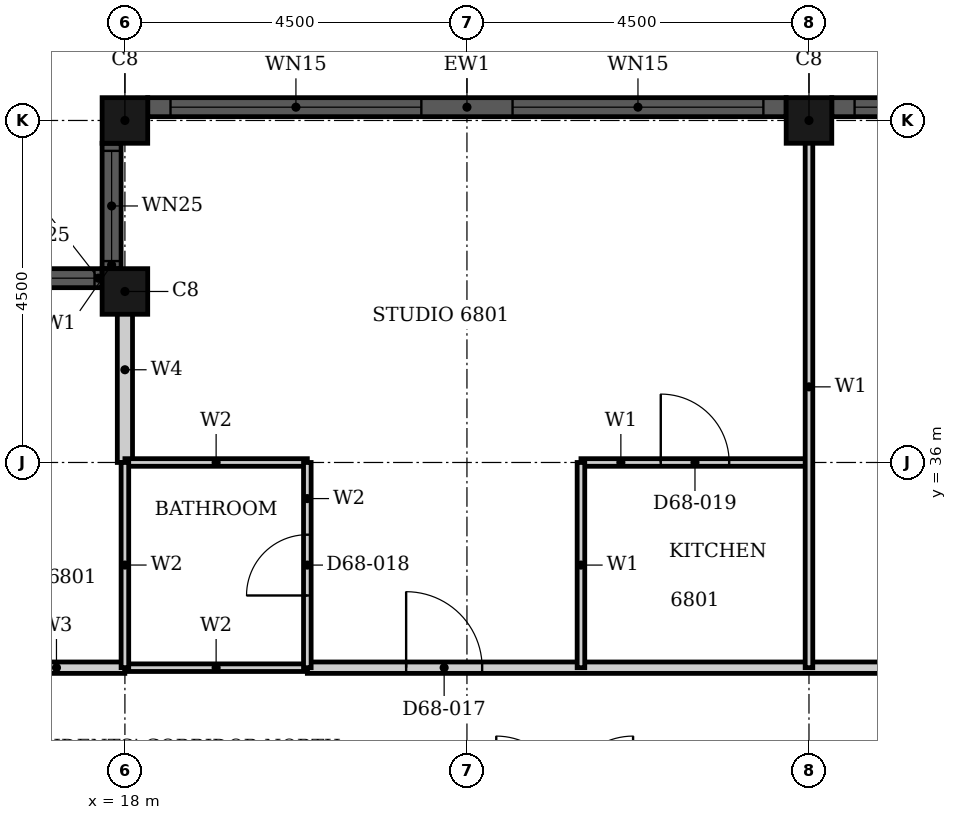
"""IFC4 building model, lengths in metres.
Left out: names, types, materials, properties, quantities, classifications, styles, units other than length and angle.
Written with IfcOpenShell. Run it as: python <this file> out.ifc"""

import sys

from ifc_helpers import new_model, si_unit, direction, frame, frame_2d, origin, origin_2d, place, context, subcontext, project, spatial, rectangle, hollow_rectangle, extrude, element, fill, save


model = new_model("IFC4")
c1 = context("Model", 3, precision=1e-05, world=origin(), true_north=direction((0.0, 1.0)))
c2 = subcontext(c1, "Body", "Model", "MODEL_VIEW")
j1 = project(units=[si_unit("LENGTHUNIT", "METRE"), si_unit("PLANEANGLEUNIT", "RADIAN")], contexts=[c1])
p1 = place(None, origin())
s1 = spatial("IfcSite", under=j1, at=p1, CompositionType="ELEMENT")
p2 = place(p1, origin())
s2 = spatial("IfcBuilding", under=s1, at=p2, CompositionType="ELEMENT")
p3 = place(p2, frame((0.0, 0.0, 267.5)))
s3 = spatial("IfcBuildingStorey", under=s2, at=p3, CompositionType="ELEMENT", Elevation=267.5)
for number, where, z_axis, x_axis in (
    (1, (27.0, 40.5, 0.0), (0.0, 0.0, 1.0), (1.0, 0.0, 0.0)),
    (2, (18.0, 40.5, 0.0), (0.0, 0.0, 1.0), (1.0, 0.0, 0.0)),
    (3, (18.0, 38.25, 0.0), (0.0, 0.0, 1.0), (1.0, 0.0, 0.0)),
):
    element("IfcColumn", number, at=place(p3, frame(where, z_axis=z_axis, x_axis=x_axis)), inside=s3, PredefinedType="COLUMN", context=c2, shape_type="SweptSolid", body=[
        extrude(hollow_rectangle(XDim=0.6, YDim=0.6, WallThickness=0.02, at=origin_2d()), origin(), (0.0, 0.0, 1.0), 3.7),
    ])
p4 = place(p3, frame((35.7, 40.675, 0.0), z_axis=(0.0, 0.0, 1.0), x_axis=(-1.0, 0.0, 0.0)))
e4 = element("IfcWall", 4, at=p4, inside=s3, PredefinedType="SOLIDWALL", context=c2, shape_type="SweptSolid", body=[
    extrude(rectangle(XDim=8.4, YDim=0.25, at=frame_2d((4.2, 0.0))), origin(), (0.0, 0.0, 1.0), 3.7),
])
p5 = place(p4, frame((0.3, 0.0, 0.45)))
e5 = element("IfcOpeningElement", 5, at=p5, cuts=e4, PredefinedType="OPENING", context=c2, shape_type="SweptSolid", body=[
    extrude(rectangle(XDim=3.3, YDim=2.3, at=frame_2d((1.65, 1.15))), frame((0.0, 0.135, 0.0), z_axis=(0.0, -1.0, 0.0), x_axis=(1.0, 0.0, 0.0)), (0.0, 0.0, 1.0), 0.27),
])
p6 = place(p4, frame((4.8, 0.0, 0.45)))
e6 = element("IfcOpeningElement", 6, at=p6, cuts=e4, PredefinedType="OPENING", context=c2, shape_type="SweptSolid", body=[
    extrude(rectangle(XDim=3.3, YDim=2.3, at=frame_2d((1.65, 1.15))), frame((0.0, 0.135, 0.0), z_axis=(0.0, -1.0, 0.0), x_axis=(1.0, 0.0, 0.0)), (0.0, 0.0, 1.0), 0.27),
])
p7 = place(p3, frame((26.7, 40.675, 0.0), z_axis=(0.0, 0.0, 1.0), x_axis=(-1.0, 0.0, 0.0)))
e7 = element("IfcWall", 7, at=p7, inside=s3, PredefinedType="SOLIDWALL", context=c2, shape_type="SweptSolid", body=[
    extrude(rectangle(XDim=8.4, YDim=0.25, at=frame_2d((4.2, 0.0))), origin(), (0.0, 0.0, 1.0), 3.7),
])
p8 = place(p7, frame((0.3, 0.0, 0.45)))
e8 = element("IfcOpeningElement", 8, at=p8, cuts=e7, PredefinedType="OPENING", context=c2, shape_type="SweptSolid", body=[
    extrude(rectangle(XDim=3.3, YDim=2.3, at=frame_2d((1.65, 1.15))), frame((0.0, 0.135, 0.0), z_axis=(0.0, -1.0, 0.0), x_axis=(1.0, 0.0, 0.0)), (0.0, 0.0, 1.0), 0.27),
])
p9 = place(p7, frame((4.8, 0.0, 0.45)))
e9 = element("IfcOpeningElement", 9, at=p9, cuts=e7, PredefinedType="OPENING", context=c2, shape_type="SweptSolid", body=[
    extrude(rectangle(XDim=3.3, YDim=2.3, at=frame_2d((1.65, 1.15))), frame((0.0, 0.135, 0.0), z_axis=(0.0, -1.0, 0.0), x_axis=(1.0, 0.0, 0.0)), (0.0, 0.0, 1.0), 0.27),
])
p10 = place(p3, frame((17.825, 40.2, 0.0), z_axis=(0.0, 0.0, 1.0), x_axis=(0.0, -1.0, 0.0)))
e10 = element("IfcWall", 10, at=p10, inside=s3, PredefinedType="SOLIDWALL", context=c2, shape_type="SweptSolid", body=[
    extrude(rectangle(XDim=1.65, YDim=0.25, at=frame_2d((0.825, 0.0))), origin(), (0.0, 0.0, 1.0), 3.7),
])
p11 = place(p10, frame((0.1, 0.0, 0.9)))
e11 = element("IfcOpeningElement", 11, at=p11, cuts=e10, PredefinedType="OPENING", context=c2, shape_type="SweptSolid", body=[
    extrude(rectangle(XDim=1.45, YDim=1.85, at=frame_2d((0.725, 0.925))), frame((0.0, 0.135, 0.0), z_axis=(0.0, -1.0, 0.0), x_axis=(1.0, 0.0, 0.0)), (0.0, 0.0, 1.0), 0.27),
])
p12 = place(p3, frame((17.7, 38.425, 0.0), z_axis=(0.0, 0.0, 1.0), x_axis=(-1.0, 0.0, 0.0)))
e12 = element("IfcWall", 12, at=p12, inside=s3, PredefinedType="SOLIDWALL", context=c2, shape_type="SweptSolid", body=[
    extrude(rectangle(XDim=1.65, YDim=0.25, at=frame_2d((0.825, 0.0))), origin(), (0.0, 0.0, 1.0), 3.7),
])
p13 = place(p12, frame((0.1, 0.0, 0.9)))
e13 = element("IfcOpeningElement", 13, at=p13, cuts=e12, PredefinedType="OPENING", context=c2, shape_type="SweptSolid", body=[
    extrude(rectangle(XDim=1.45, YDim=1.85, at=frame_2d((0.725, 0.925))), frame((0.0, 0.135, 0.0), z_axis=(0.0, -1.0, 0.0), x_axis=(1.0, 0.0, 0.0)), (0.0, 0.0, 1.0), 0.27),
])
p14 = place(p3, frame((20.4, 33.3, 0.0), z_axis=(0.0, 0.0, 1.0), x_axis=(1.0, 0.0, 0.0)))
e14 = element("IfcWall", 14, at=p14, inside=s3, PredefinedType="PARTITIONING", context=c2, shape_type="SweptSolid", body=[
    extrude(rectangle(XDim=22.2, YDim=0.15, at=frame_2d((11.1, 0.0))), origin(), (0.0, 0.0, 1.0), 3.4),
])
p15 = place(p14, frame((1.3, 0.0, 0.0)))
e15 = element("IfcOpeningElement", 15, at=p15, cuts=e14, PredefinedType="OPENING", context=c2, shape_type="SweptSolid", body=[
    extrude(rectangle(XDim=1.0, YDim=2.2, at=frame_2d((0.5, 1.1))), frame((0.0, 0.085, 0.0), z_axis=(0.0, -1.0, 0.0), x_axis=(1.0, 0.0, 0.0)), (0.0, 0.0, 1.0), 0.17),
])
p16 = place(p14, frame((10.6, 0.0, 0.0)))
e16 = element("IfcOpeningElement", 16, at=p16, cuts=e14, PredefinedType="OPENING", context=c2, shape_type="SweptSolid", body=[
    extrude(rectangle(XDim=1.0, YDim=2.1, at=frame_2d((0.5, 1.05))), frame((0.0, 0.085, 0.0), z_axis=(0.0, -1.0, 0.0), x_axis=(1.0, 0.0, 0.0)), (0.0, 0.0, 1.0), 0.17),
])
p17 = place(p14, frame((19.9, 0.0, 0.0)))
e17 = element("IfcOpeningElement", 17, at=p17, cuts=e14, PredefinedType="OPENING", context=c2, shape_type="SweptSolid", body=[
    extrude(rectangle(XDim=1.0, YDim=2.2, at=frame_2d((0.5, 1.1))), frame((0.0, 0.085, 0.0), z_axis=(0.0, -1.0, 0.0), x_axis=(1.0, 0.0, 0.0)), (0.0, 0.0, 1.0), 0.17),
])
p18 = place(p3, frame((16.2, 33.3, 0.0), z_axis=(0.0, 0.0, 1.0), x_axis=(1.0, 0.0, 0.0)))
e18 = element("IfcWall", 18, at=p18, inside=s3, PredefinedType="PARTITIONING", context=c2, shape_type="SweptSolid", body=[
    extrude(rectangle(XDim=1.799, YDim=0.15, at=frame_2d((0.899, 0.0))), origin(), (0.0, 0.0, 1.0), 3.4),
])
p19 = place(p3, frame((24.0, 36.0, 0.0), z_axis=(0.0, 0.0, 1.0), x_axis=(1.0, 0.0, 0.0)))
e19 = element("IfcWall", 19, at=p19, inside=s3, PredefinedType="PARTITIONING", context=c2, shape_type="SweptSolid", body=[
    extrude(rectangle(XDim=3.0, YDim=0.1, at=frame_2d((1.5, 0.0))), origin(), (0.0, 0.0, 1.0), 3.4),
])
p20 = place(p19, frame((1.05, 0.0, 0.0)))
e20 = element("IfcOpeningElement", 20, at=p20, cuts=e19, PredefinedType="OPENING", context=c2, shape_type="SweptSolid", body=[
    extrude(rectangle(XDim=0.9, YDim=2.1, at=frame_2d((0.45, 1.05))), frame((0.0, 0.06, 0.0), z_axis=(0.0, -1.0, 0.0), x_axis=(1.0, 0.0, 0.0)), (0.0, 0.0, 1.0), 0.12),
])
p21 = place(p3, frame((24.0, 33.3, 0.0), z_axis=(0.0, 0.0, 1.0), x_axis=(0.0, 1.0, 0.0)))
e21 = element("IfcWall", 21, at=p21, inside=s3, PredefinedType="PARTITIONING", context=c2, shape_type="SweptSolid", body=[
    extrude(rectangle(XDim=2.7, YDim=0.1, at=frame_2d((1.35, 0.0))), origin(), (0.0, 0.0, 1.0), 3.4),
])
p22 = place(p3, frame((27.0, 33.3, 0.0), z_axis=(0.0, 0.0, 1.0), x_axis=(0.0, 1.0, 0.0)))
e22 = element("IfcWall", 22, at=p22, inside=s3, PredefinedType="PARTITIONING", context=c2, shape_type="SweptSolid", body=[
    extrude(rectangle(XDim=7.39, YDim=0.1, at=frame_2d((3.695, 0.0))), origin(), (0.0, 0.0, 1.0), 3.4),
])
p23 = place(p3, frame((18.0, 36.0, 0.0), z_axis=(0.0, 0.0, 1.0), x_axis=(0.0, 1.0, 0.0)))
e23 = element("IfcWall", 23, at=p23, inside=s3, PredefinedType="PARTITIONING", context=c2, shape_type="SweptSolid", body=[
    extrude(rectangle(XDim=2.44, YDim=0.2, at=frame_2d((1.22, 0.0))), origin(), (0.0, 0.0, 1.0), 3.4),
])
for number, where, z_axis, x_axis in (
    (24, (18.0, 33.3, 0.0), (0.0, 0.0, 1.0), (1.0, 0.0, 0.0)),
    (25, (18.0, 36.0, 0.0), (0.0, 0.0, 1.0), (1.0, 0.0, 0.0)),
):
    element("IfcWall", number, at=place(p3, frame(where, z_axis=z_axis, x_axis=x_axis)), inside=s3, PredefinedType="PARTITIONING", context=c2, shape_type="SweptSolid", body=[
        extrude(rectangle(XDim=2.4, YDim=0.1, at=frame_2d((1.2, 0.0))), origin(), (0.0, 0.0, 1.0), 3.4),
    ])
p24 = place(p3, frame((18.0, 33.301, 0.0), z_axis=(0.0, 0.0, 1.0), x_axis=(0.0, 1.0, 0.0)))
e26 = element("IfcWall", 26, at=p24, inside=s3, PredefinedType="PARTITIONING", context=c2, shape_type="SweptSolid", body=[
    extrude(rectangle(XDim=2.699, YDim=0.1, at=frame_2d((1.35, 0.0))), origin(), (0.0, 0.0, 1.0), 3.4),
])
p25 = place(p3, frame((20.4, 33.3, 0.0), z_axis=(0.0, 0.0, 1.0), x_axis=(0.0, 1.0, 0.0)))
e27 = element("IfcWall", 27, at=p25, inside=s3, PredefinedType="PARTITIONING", context=c2, shape_type="SweptSolid", body=[
    extrude(rectangle(XDim=2.7, YDim=0.1, at=frame_2d((1.35, 0.0))), origin(), (0.0, 0.0, 1.0), 3.4),
])
p26 = place(p25, frame((0.95, 0.0, 0.0)))
e28 = element("IfcOpeningElement", 28, at=p26, cuts=e27, PredefinedType="OPENING", context=c2, shape_type="SweptSolid", body=[
    extrude(rectangle(XDim=0.8, YDim=2.1, at=frame_2d((0.4, 1.05))), frame((0.0, 0.06, 0.0), z_axis=(0.0, -1.0, 0.0), x_axis=(1.0, 0.0, 0.0)), (0.0, 0.0, 1.0), 0.12),
])
p27 = place(p6, origin())
e29 = element("IfcWindow", 29, at=p27, inside=s3, PartitioningType="SINGLE_PANEL", PredefinedType="WINDOW", context=c2, shape_type="SweptSolid", body=[
    extrude(rectangle(XDim=3.3, YDim=2.3, at=frame_2d((1.65, 1.15))), frame((0.0, 0.03, 0.0), z_axis=(0.0, -1.0, 0.0), x_axis=(1.0, 0.0, 0.0)), (0.0, 0.0, 1.0), 0.06),
])
fill(e6, e29)
p28 = place(p8, origin())
e30 = element("IfcWindow", 30, at=p28, inside=s3, PartitioningType="SINGLE_PANEL", PredefinedType="WINDOW", context=c2, shape_type="SweptSolid", body=[
    extrude(rectangle(XDim=3.3, YDim=2.3, at=frame_2d((1.65, 1.15))), frame((0.0, 0.03, 0.0), z_axis=(0.0, -1.0, 0.0), x_axis=(1.0, 0.0, 0.0)), (0.0, 0.0, 1.0), 0.06),
])
fill(e8, e30)
p29 = place(p9, origin())
e31 = element("IfcWindow", 31, at=p29, inside=s3, PartitioningType="SINGLE_PANEL", PredefinedType="WINDOW", context=c2, shape_type="SweptSolid", body=[
    extrude(rectangle(XDim=3.3, YDim=2.3, at=frame_2d((1.65, 1.15))), frame((0.0, 0.03, 0.0), z_axis=(0.0, -1.0, 0.0), x_axis=(1.0, 0.0, 0.0)), (0.0, 0.0, 1.0), 0.06),
])
fill(e9, e31)
p30 = place(p11, origin())
e32 = element("IfcWindow", 32, at=p30, inside=s3, PartitioningType="SINGLE_PANEL", PredefinedType="WINDOW", context=c2, shape_type="SweptSolid", body=[
    extrude(rectangle(XDim=1.45, YDim=1.85, at=frame_2d((0.725, 0.925))), frame((0.0, 0.03, 0.0), z_axis=(0.0, -1.0, 0.0), x_axis=(1.0, 0.0, 0.0)), (0.0, 0.0, 1.0), 0.06),
])
fill(e11, e32)
p31 = place(p13, origin())
e33 = element("IfcWindow", 33, at=p31, inside=s3, PartitioningType="SINGLE_PANEL", PredefinedType="WINDOW", context=c2, shape_type="SweptSolid", body=[
    extrude(rectangle(XDim=1.45, YDim=1.85, at=frame_2d((0.725, 0.925))), frame((0.0, 0.03, 0.0), z_axis=(0.0, -1.0, 0.0), x_axis=(1.0, 0.0, 0.0)), (0.0, 0.0, 1.0), 0.06),
])
fill(e13, e33)
p32 = place(p15, origin())
e34 = element("IfcDoor", 34, at=p32, inside=s3, OperationType="SINGLE_SWING_LEFT", PredefinedType="DOOR", context=c2, shape_type="SweptSolid", body=[
    extrude(rectangle(XDim=1.0, YDim=2.2, at=frame_2d((0.5, 1.1))), frame((0.0, 0.025, 0.0), z_axis=(0.0, -1.0, 0.0), x_axis=(1.0, 0.0, 0.0)), (0.0, 0.0, 1.0), 0.05),
])
fill(e15, e34)
p33 = place(p26, origin())
e35 = element("IfcDoor", 35, at=p33, inside=s3, OperationType="SINGLE_SWING_RIGHT", PredefinedType="DOOR", context=c2, shape_type="SweptSolid", body=[
    extrude(rectangle(XDim=0.8, YDim=2.1, at=frame_2d((0.4, 1.05))), frame((0.0, 0.025, 0.0), z_axis=(0.0, -1.0, 0.0), x_axis=(1.0, 0.0, 0.0)), (0.0, 0.0, 1.0), 0.05),
])
fill(e28, e35)
p34 = place(p20, origin())
e36 = element("IfcDoor", 36, at=p34, inside=s3, OperationType="SINGLE_SWING_RIGHT", PredefinedType="DOOR", context=c2, shape_type="SweptSolid", body=[
    extrude(rectangle(XDim=0.9, YDim=2.1, at=frame_2d((0.45, 1.05))), frame((0.0, 0.025, 0.0), z_axis=(0.0, -1.0, 0.0), x_axis=(1.0, 0.0, 0.0)), (0.0, 0.0, 1.0), 0.05),
])
fill(e20, e36)
save(model, sys.argv[1])
